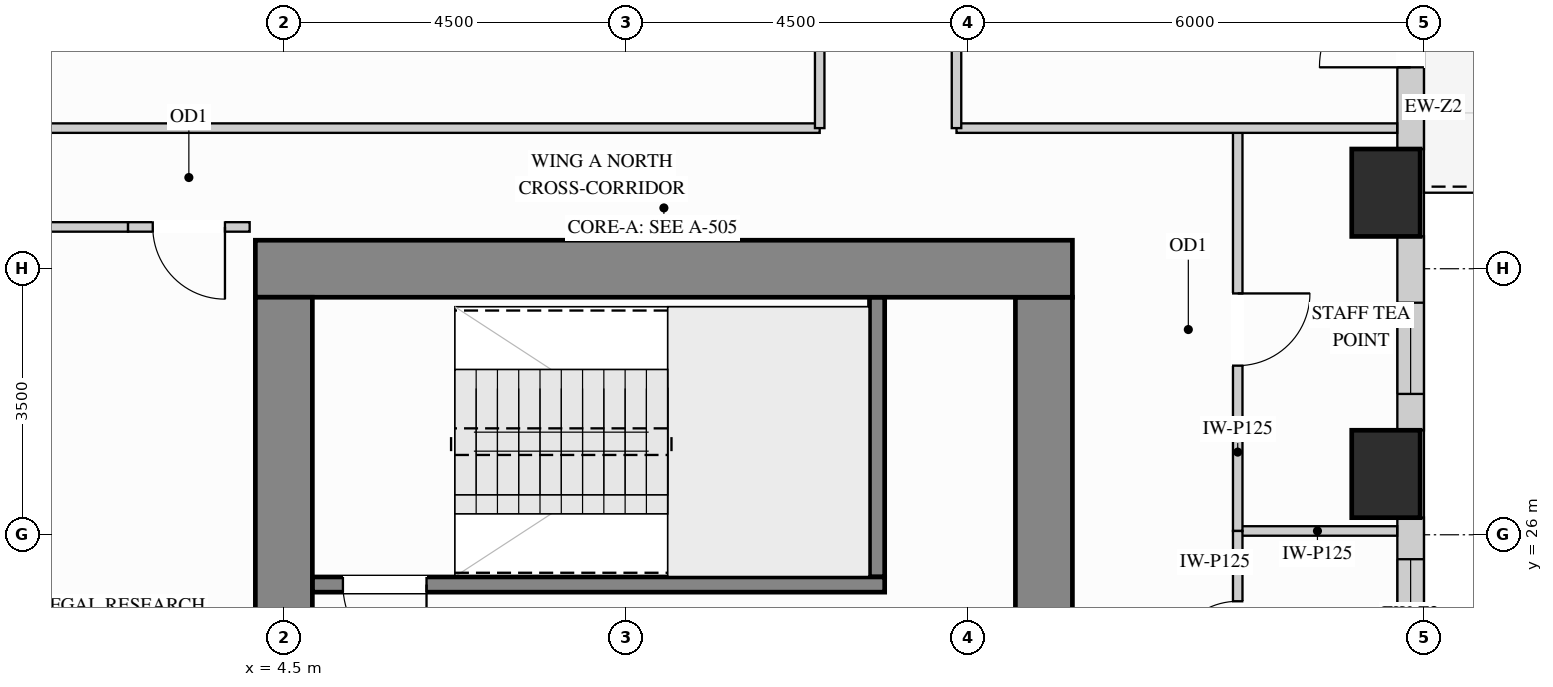
"""IFC4 building model, lengths in metres.
Left out: names, types, materials, properties, quantities, classifications, styles, units other than length and angle.
Written with IfcOpenShell. Run it as: python <this file> out.ifc"""

import sys

from ifc_helpers import new_model, si_unit, direction, frame, frame_2d, origin, origin_2d, place, context, subcontext, project, spatial, rectangle, extrude, source, transform, mapped, element, fill, save


model = new_model("IFC4")
c1 = context("Model", 3, precision=1e-05, world=origin(), true_north=direction((0.0, 1.0)))
c2 = subcontext(c1, "Body", "Model", "MODEL_VIEW")
j1 = project(units=[si_unit("LENGTHUNIT", "METRE"), si_unit("PLANEANGLEUNIT", "RADIAN")], contexts=[c1])
p1 = place(None, origin())
s1 = spatial("IfcSite", under=j1, at=p1, CompositionType="ELEMENT")
p2 = place(p1, origin())
s2 = spatial("IfcBuilding", under=s1, at=p2, CompositionType="ELEMENT")
p3 = place(p2, frame((0.0, 0.0, 113.4)))
s3 = spatial("IfcBuildingStorey", under=s2, at=p3, CompositionType="ELEMENT", Elevation=113.4)
m1 = source(origin(), c2, "Body", "SweptSolid", [
    extrude(rectangle(XDim=0.9, YDim=1.15, at=origin_2d()), origin(), (0.0, 0.0, 1.0), 3.38),
])
for number, where, z_axis, x_axis in (
    (1, (19.0, 26.8, 0.0), (0.0, 0.0, 1.0), (1.0, 0.0, 0.0)),
    (2, (19.0, 30.5, 0.0), (0.0, 0.0, 1.0), (1.0, 0.0, 0.0)),
):
    element("IfcColumn", number, at=place(p3, frame(where, z_axis=z_axis, x_axis=x_axis)), inside=s3, PredefinedType="COLUMN", context=c2, shape_type="MappedRepresentation", body=[
        mapped(m1, transform((0.0, 0.0, 0.0), x_axis=(1.0, 0.0, 0.0), y_axis=(0.0, 1.0, 0.0), z_axis=(0.0, 0.0, 1.0))),
    ])
m2 = source(origin(), c2, "Body", "SweptSolid", [
    extrude(rectangle(XDim=8.245, YDim=0.75, at=frame_2d((4.123, 0.0))), origin(), (0.0, 0.0, 1.0), 3.38),
])
p4 = place(p3, frame((14.5, 20.88, 0.0), z_axis=(0.0, 0.0, 1.0), x_axis=(0.0, 1.0, 0.0)))
e3 = element("IfcWall", 3, at=p4, inside=s3, PredefinedType="SHEAR", context=c2, shape_type="MappedRepresentation", body=[
    mapped(m2, transform((0.0, 0.0, 0.0), x_axis=(1.0, 0.0, 0.0), y_axis=(0.0, 1.0, 0.0), z_axis=(0.0, 0.0, 1.0))),
])
m3 = source(origin(), c2, "Body", "SweptSolid", [
    extrude(rectangle(XDim=10.75, YDim=0.75, at=frame_2d((5.375, 0.0))), origin(), (0.0, 0.0, 1.0), 3.38),
])
p5 = place(p3, frame((4.125, 29.5, 0.0), z_axis=(0.0, 0.0, 1.0), x_axis=(1.0, 0.0, 0.0)))
e4 = element("IfcWall", 4, at=p5, inside=s3, PredefinedType="SHEAR", context=c2, shape_type="MappedRepresentation", body=[
    mapped(m3, transform((0.0, 0.0, 0.0), x_axis=(1.0, 0.0, 0.0), y_axis=(0.0, 1.0, 0.0), z_axis=(0.0, 0.0, 1.0))),
])
m4 = source(origin(), c2, "Body", "SweptSolid", [
    extrude(rectangle(XDim=20.25, YDim=0.75, at=frame_2d((10.125, 0.0))), origin(), (0.0, 0.0, 1.0), 3.38),
])
p6 = place(p3, frame((4.5, 8.875, 0.0), z_axis=(0.0, 0.0, 1.0), x_axis=(0.0, 1.0, 0.0)))
e5 = element("IfcWall", 5, at=p6, inside=s3, PredefinedType="SHEAR", context=c2, shape_type="MappedRepresentation", body=[
    mapped(m4, transform((0.0, 0.0, 0.0), x_axis=(1.0, 0.0, 0.0), y_axis=(0.0, 1.0, 0.0), z_axis=(0.0, 0.0, 1.0))),
])
p7 = place(p3, frame((19.325, 23.073, 0.0), z_axis=(0.0, 0.0, 1.0), x_axis=(0.0, 1.0, 0.0)))
e6 = element("IfcWall", 6, at=p7, inside=s3, PredefinedType="SOLIDWALL", context=c2, shape_type="SweptSolid", body=[
    extrude(rectangle(XDim=3.154, YDim=0.35, at=frame_2d((1.577, 0.0))), origin(), (0.0, 0.0, 1.0), 2.519),
])
p8 = place(p7, frame((1.105, 0.0, 0.78)))
e7 = element("IfcOpeningElement", 7, at=p8, cuts=e6, PredefinedType="OPENING", context=c2, shape_type="SweptSolid", body=[
    extrude(rectangle(XDim=1.5, YDim=1.559, at=frame_2d((0.75, 0.78))), frame((0.0, 0.185, 0.0), z_axis=(0.0, -1.0, 0.0), x_axis=(1.0, 0.0, 0.0)), (0.0, 0.0, 1.0), 0.37),
])
p9 = place(p3, frame((19.325, 27.373, 0.0), z_axis=(0.0, 0.0, 1.0), x_axis=(0.0, 1.0, 0.0)))
e8 = element("IfcWall", 8, at=p9, inside=s3, PredefinedType="SOLIDWALL", context=c2, shape_type="SweptSolid", body=[
    extrude(rectangle(XDim=2.554, YDim=0.35, at=frame_2d((1.277, 0.0))), origin(), (0.0, 0.0, 1.0), 2.519),
])
p10 = place(p9, frame((0.48, 0.0, 0.78)))
e9 = element("IfcOpeningElement", 9, at=p10, cuts=e8, PredefinedType="OPENING", context=c2, shape_type="SweptSolid", body=[
    extrude(rectangle(XDim=1.2, YDim=1.559, at=frame_2d((0.6, 0.78))), frame((0.0, 0.185, 0.0), z_axis=(0.0, -1.0, 0.0), x_axis=(1.0, 0.0, 0.0)), (0.0, 0.0, 1.0), 0.37),
])
p11 = place(p3, frame((19.325, 31.073, 0.0), z_axis=(0.0, 0.0, 1.0), x_axis=(0.0, 1.0, 0.0)))
e10 = element("IfcWall", 10, at=p11, inside=s3, PredefinedType="SOLIDWALL", context=c2, shape_type="SweptSolid", body=[
    extrude(rectangle(XDim=3.354, YDim=0.35, at=frame_2d((1.677, 0.0))), origin(), (0.0, 0.0, 1.0), 2.519),
])
p12 = place(p11, frame((1.077, 0.0, 0.0)))
e11 = element("IfcOpeningElement", 11, at=p12, cuts=e10, PredefinedType="OPENING", context=c2, shape_type="SweptSolid", body=[
    extrude(rectangle(XDim=1.2, YDim=2.15, at=frame_2d((0.6, 1.075))), frame((0.0, 0.185, 0.0), z_axis=(0.0, -1.0, 0.0), x_axis=(1.0, 0.0, 0.0)), (0.0, 0.0, 1.0), 0.37),
])
m5 = source(origin(), c2, "Body", "SweptSolid", [
    extrude(rectangle(XDim=2.098, YDim=0.125, at=frame_2d((1.049, 0.0))), origin(), (0.0, 0.0, 1.0), 3.365),
])
p13 = place(p3, frame((17.05, 26.05, 0.0), z_axis=(0.0, 0.0, 1.0), x_axis=(1.0, 0.0, 0.0)))
e12 = element("IfcWall", 12, at=p13, inside=s3, PredefinedType="PARTITIONING", context=c2, shape_type="MappedRepresentation", body=[
    mapped(m5, transform((0.0, 0.0, 0.0), x_axis=(1.0, 0.0, 0.0), y_axis=(0.0, 1.0, 0.0), z_axis=(0.0, 0.0, 1.0))),
])
p14 = place(p3, frame((17.05, 26.05, 0.0), z_axis=(0.0, 0.0, 1.0), x_axis=(0.0, 1.0, 0.0)))
e13 = element("IfcWall", 13, at=p14, inside=s3, PredefinedType="PARTITIONING", context=c2, shape_type="SweptSolid", body=[
    extrude(rectangle(XDim=5.3, YDim=0.125, at=frame_2d((2.65, 0.0))), origin(), (0.0, 0.0, 1.0), 3.365),
])
p15 = place(p14, frame((2.175, 0.0, 0.0)))
e14 = element("IfcOpeningElement", 14, at=p15, cuts=e13, PredefinedType="OPENING", context=c2, shape_type="SweptSolid", body=[
    extrude(rectangle(XDim=0.95, YDim=2.15, at=frame_2d((0.475, 1.075))), frame((0.0, 0.073, 0.0), z_axis=(0.0, -1.0, 0.0), x_axis=(1.0, 0.0, 0.0)), (0.0, 0.0, 1.0), 0.145),
])
p16 = place(p3, frame((17.05, 23.35, 0.0), z_axis=(0.0, 0.0, 1.0), x_axis=(0.0, 1.0, 0.0)))
e15 = element("IfcWall", 15, at=p16, inside=s3, PredefinedType="PARTITIONING", context=c2, shape_type="SweptSolid", body=[
    extrude(rectangle(XDim=2.7, YDim=0.125, at=frame_2d((1.35, 0.0))), origin(), (0.0, 0.0, 1.0), 3.365),
])
p17 = place(p16, frame((0.875, 0.0, 0.0)))
e16 = element("IfcOpeningElement", 16, at=p17, cuts=e15, PredefinedType="OPENING", context=c2, shape_type="SweptSolid", body=[
    extrude(rectangle(XDim=0.9, YDim=2.15, at=frame_2d((0.45, 1.075))), frame((0.0, 0.073, 0.0), z_axis=(0.0, -1.0, 0.0), x_axis=(1.0, 0.0, 0.0)), (0.0, 0.0, 1.0), 0.145),
])
m6 = source(origin(), c2, "Body", "SweptSolid", [
    extrude(rectangle(XDim=5.798, YDim=0.125, at=frame_2d((2.899, 0.0))), origin(), (0.0, 0.0, 1.0), 3.365),
])
p18 = place(p3, frame((13.35, 31.35, 0.0), z_axis=(0.0, 0.0, 1.0), x_axis=(1.0, 0.0, 0.0)))
e17 = element("IfcWall", 17, at=p18, inside=s3, PredefinedType="PARTITIONING", context=c2, shape_type="MappedRepresentation", body=[
    mapped(m6, transform((0.0, 0.0, 0.0), x_axis=(1.0, 0.0, 0.0), y_axis=(0.0, 1.0, 0.0), z_axis=(0.0, 0.0, 1.0))),
])
m7 = source(origin(), c2, "Body", "SweptSolid", [
    extrude(rectangle(XDim=11.198, YDim=0.125, at=frame_2d((5.599, 0.0))), origin(), (0.0, 0.0, 1.0), 3.365),
])
p19 = place(p3, frame((0.352, 31.35, 0.0), z_axis=(0.0, 0.0, 1.0), x_axis=(1.0, 0.0, 0.0)))
e18 = element("IfcWall", 18, at=p19, inside=s3, PredefinedType="PARTITIONING", context=c2, shape_type="MappedRepresentation", body=[
    mapped(m7, transform((0.0, 0.0, 0.0), x_axis=(1.0, 0.0, 0.0), y_axis=(0.0, 1.0, 0.0), z_axis=(0.0, 0.0, 1.0))),
])
m8 = source(origin(), c2, "Body", "SweptSolid", [
    extrude(rectangle(XDim=1.26, YDim=0.125, at=frame_2d((0.63, 0.0))), origin(), (0.0, 0.0, 1.0), 3.365),
])
p20 = place(p3, frame((1.19, 30.05, 0.0), z_axis=(0.0, 0.0, 1.0), x_axis=(1.0, 0.0, 0.0)))
e19 = element("IfcWall", 19, at=p20, inside=s3, PredefinedType="PARTITIONING", context=c2, shape_type="MappedRepresentation", body=[
    mapped(m8, transform((0.0, 0.0, 0.0), x_axis=(1.0, 0.0, 0.0), y_axis=(0.0, 1.0, 0.0), z_axis=(0.0, 0.0, 1.0))),
])
p21 = place(p3, frame((2.45, 30.05, 0.0), z_axis=(0.0, 0.0, 1.0), x_axis=(1.0, 0.0, 0.0)))
e20 = element("IfcWall", 20, at=p21, inside=s3, PredefinedType="PARTITIONING", context=c2, shape_type="SweptSolid", body=[
    extrude(rectangle(XDim=1.6, YDim=0.125, at=frame_2d((0.8, 0.0))), origin(), (0.0, 0.0, 1.0), 3.365),
])
p22 = place(p21, frame((0.325, 0.0, 0.0)))
e21 = element("IfcOpeningElement", 21, at=p22, cuts=e20, PredefinedType="OPENING", context=c2, shape_type="SweptSolid", body=[
    extrude(rectangle(XDim=0.95, YDim=2.15, at=frame_2d((0.475, 1.075))), frame((0.0, 0.073, 0.0), z_axis=(0.0, -1.0, 0.0), x_axis=(1.0, 0.0, 0.0)), (0.0, 0.0, 1.0), 0.145),
])
p23 = place(p3, frame((13.35, 31.35, 0.0), z_axis=(0.0, 0.0, 1.0), x_axis=(0.0, 1.0, 0.0)))
e22 = element("IfcWall", 22, at=p23, inside=s3, PredefinedType="PARTITIONING", context=c2, shape_type="SweptSolid", body=[
    extrude(rectangle(XDim=6.078, YDim=0.125, at=frame_2d((3.039, 0.0))), origin(), (0.0, 0.0, 1.0), 3.365),
])
p24 = place(p23, frame((2.564, 0.0, 0.0)))
e23 = element("IfcOpeningElement", 23, at=p24, cuts=e22, PredefinedType="OPENING", context=c2, shape_type="SweptSolid", body=[
    extrude(rectangle(XDim=0.95, YDim=2.15, at=frame_2d((0.475, 1.075))), frame((0.0, 0.073, 0.0), z_axis=(0.0, -1.0, 0.0), x_axis=(1.0, 0.0, 0.0)), (0.0, 0.0, 1.0), 0.145),
])
p25 = place(p3, frame((11.55, 31.35, 0.0), z_axis=(0.0, 0.0, 1.0), x_axis=(0.0, 1.0, 0.0)))
e24 = element("IfcWall", 24, at=p25, inside=s3, PredefinedType="PARTITIONING", context=c2, shape_type="SweptSolid", body=[
    extrude(rectangle(XDim=4.972, YDim=0.125, at=frame_2d((2.486, 0.0))), origin(), (0.0, 0.0, 1.0), 3.365),
])
p26 = place(p25, frame((2.011, 0.0, 0.0)))
e25 = element("IfcOpeningElement", 25, at=p26, cuts=e24, PredefinedType="OPENING", context=c2, shape_type="SweptSolid", body=[
    extrude(rectangle(XDim=0.95, YDim=2.15, at=frame_2d((0.475, 1.075))), frame((0.0, 0.073, 0.0), z_axis=(0.0, -1.0, 0.0), x_axis=(1.0, 0.0, 0.0)), (0.0, 0.0, 1.0), 0.145),
])
m9 = source(origin(), c2, "Body", "SweptSolid", [
    extrude(rectangle(XDim=3.678, YDim=0.2, at=frame_2d((1.839, 0.0))), origin(), (0.0, 0.0, 1.0), 3.38),
])
p27 = place(p3, frame((12.305, 25.445, 0.0), z_axis=(0.0, 0.0, 1.0), x_axis=(0.0, 1.0, 0.0)))
e26 = element("IfcWall", 26, at=p27, inside=s3, PredefinedType="SHEAR", context=c2, shape_type="MappedRepresentation", body=[
    mapped(m9, transform((0.0, 0.0, 0.0), x_axis=(1.0, 0.0, 0.0), y_axis=(0.0, 1.0, 0.0), z_axis=(0.0, 0.0, 1.0))),
])
p28 = place(p3, frame((4.877, 25.345, 0.0), z_axis=(0.0, 0.0, 1.0), x_axis=(1.0, 0.0, 0.0)))
e27 = element("IfcWall", 27, at=p28, inside=s3, PredefinedType="SHEAR", context=c2, shape_type="SweptSolid", body=[
    extrude(rectangle(XDim=7.528, YDim=0.2, at=frame_2d((3.764, 0.0))), origin(), (0.0, 0.0, 1.0), 3.38),
])
p29 = place(p28, frame((0.4, 0.0, 0.0)))
e28 = element("IfcOpeningElement", 28, at=p29, cuts=e27, PredefinedType="OPENING", context=c2, shape_type="SweptSolid", body=[
    extrude(rectangle(XDim=1.1, YDim=2.15, at=frame_2d((0.55, 1.075))), frame((0.0, 0.11, 0.0), z_axis=(0.0, -1.0, 0.0), x_axis=(1.0, 0.0, 0.0)), (0.0, 0.0, 1.0), 0.22),
])
m10 = source(origin(), c2, "Body", "SweptSolid", [
    extrude(rectangle(XDim=1.2, YDim=2.15, at=frame_2d((0.6, 1.075))), frame((0.0, 0.025, 0.0), z_axis=(0.0, -1.0, 0.0), x_axis=(1.0, 0.0, 0.0)), (0.0, 0.0, 1.0), 0.05),
])
p30 = place(p12, frame((1.2, 0.0, 0.0), z_axis=(0.0, 0.0, 1.0), x_axis=(-1.0, 0.0, 0.0)))
e29 = element("IfcDoor", 29, at=p30, inside=s3, OperationType="SINGLE_SWING_LEFT", PredefinedType="DOOR", context=c2, shape_type="MappedRepresentation", body=[
    mapped(m10, transform((0.0, 0.0, 0.0), x_axis=(1.0, 0.0, 0.0), y_axis=(0.0, 1.0, 0.0), z_axis=(0.0, 0.0, 1.0))),
])
fill(e11, e29)
m11 = source(origin(), c2, "Body", "SweptSolid", [
    extrude(rectangle(XDim=0.95, YDim=2.15, at=frame_2d((0.475, 1.075))), frame((0.0, 0.025, 0.0), z_axis=(0.0, -1.0, 0.0), x_axis=(1.0, 0.0, 0.0)), (0.0, 0.0, 1.0), 0.05),
])
p31 = place(p15, origin())
e30 = element("IfcDoor", 30, at=p31, inside=s3, OperationType="SINGLE_SWING_RIGHT", PredefinedType="DOOR", context=c2, shape_type="MappedRepresentation", body=[
    mapped(m11, transform((0.0, 0.0, 0.0), x_axis=(1.0, 0.0, 0.0), y_axis=(0.0, 1.0, 0.0), z_axis=(0.0, 0.0, 1.0))),
])
fill(e14, e30)
p32 = place(p22, origin())
e31 = element("IfcDoor", 31, at=p32, inside=s3, OperationType="SINGLE_SWING_RIGHT", PredefinedType="DOOR", context=c2, shape_type="MappedRepresentation", body=[
    mapped(m11, transform((0.0, 0.0, 0.0), x_axis=(1.0, 0.0, 0.0), y_axis=(0.0, 1.0, 0.0), z_axis=(0.0, 0.0, 1.0))),
])
fill(e21, e31)
m12 = source(origin(), c2, "Body", "SweptSolid", [
    extrude(rectangle(XDim=1.1, YDim=2.15, at=frame_2d((0.55, 1.075))), frame((0.0, 0.025, 0.0), z_axis=(0.0, -1.0, 0.0), x_axis=(1.0, 0.0, 0.0)), (0.0, 0.0, 1.0), 0.05),
])
p33 = place(p29, origin())
e32 = element("IfcDoor", 32, at=p33, inside=s3, OperationType="SINGLE_SWING_RIGHT", PredefinedType="DOOR", context=c2, shape_type="MappedRepresentation", body=[
    mapped(m12, transform((0.0, 0.0, 0.0), x_axis=(1.0, 0.0, 0.0), y_axis=(0.0, 1.0, 0.0), z_axis=(0.0, 0.0, 1.0))),
])
fill(e28, e32)
m13 = source(origin(), c2, "Body", "SweptSolid", [
    extrude(rectangle(XDim=0.9, YDim=2.15, at=frame_2d((0.45, 1.075))), frame((0.0, 0.025, 0.0), z_axis=(0.0, -1.0, 0.0), x_axis=(1.0, 0.0, 0.0)), (0.0, 0.0, 1.0), 0.05),
])
p34 = place(p17, origin())
e33 = element("IfcDoor", 33, at=p34, inside=s3, OperationType="SINGLE_SWING_LEFT", PredefinedType="DOOR", context=c2, shape_type="MappedRepresentation", body=[
    mapped(m13, transform((0.0, 0.0, 0.0), x_axis=(1.0, 0.0, 0.0), y_axis=(0.0, 1.0, 0.0), z_axis=(0.0, 0.0, 1.0))),
])
fill(e16, e33)
m14 = source(origin(), c2, "Body", "SweptSolid", [
    extrude(rectangle(XDim=1.2, YDim=1.559, at=frame_2d((0.6, 0.78))), frame((0.0, 0.03, 0.0), z_axis=(0.0, -1.0, 0.0), x_axis=(1.0, 0.0, 0.0)), (0.0, 0.0, 1.0), 0.06),
])
p35 = place(p10, origin())
e34 = element("IfcWindow", 34, at=p35, inside=s3, PartitioningType="SINGLE_PANEL", PredefinedType="WINDOW", context=c2, shape_type="MappedRepresentation", body=[
    mapped(m14, transform((0.0, 0.0, 0.0), x_axis=(1.0, 0.0, 0.0), y_axis=(0.0, 1.0, 0.0), z_axis=(0.0, 0.0, 1.0))),
])
fill(e9, e34)
m15 = source(origin(), c2, "Body", "SweptSolid", [
    extrude(rectangle(XDim=1.5, YDim=1.559, at=frame_2d((0.75, 0.78))), frame((0.0, 0.03, 0.0), z_axis=(0.0, -1.0, 0.0), x_axis=(1.0, 0.0, 0.0)), (0.0, 0.0, 1.0), 0.06),
])
p36 = place(p8, origin())
e35 = element("IfcWindow", 35, at=p36, inside=s3, PartitioningType="SINGLE_PANEL", PredefinedType="WINDOW", context=c2, shape_type="MappedRepresentation", body=[
    mapped(m15, transform((0.0, 0.0, 0.0), x_axis=(1.0, 0.0, 0.0), y_axis=(0.0, 1.0, 0.0), z_axis=(0.0, 0.0, 1.0))),
])
fill(e7, e35)
save(model, sys.argv[1])
